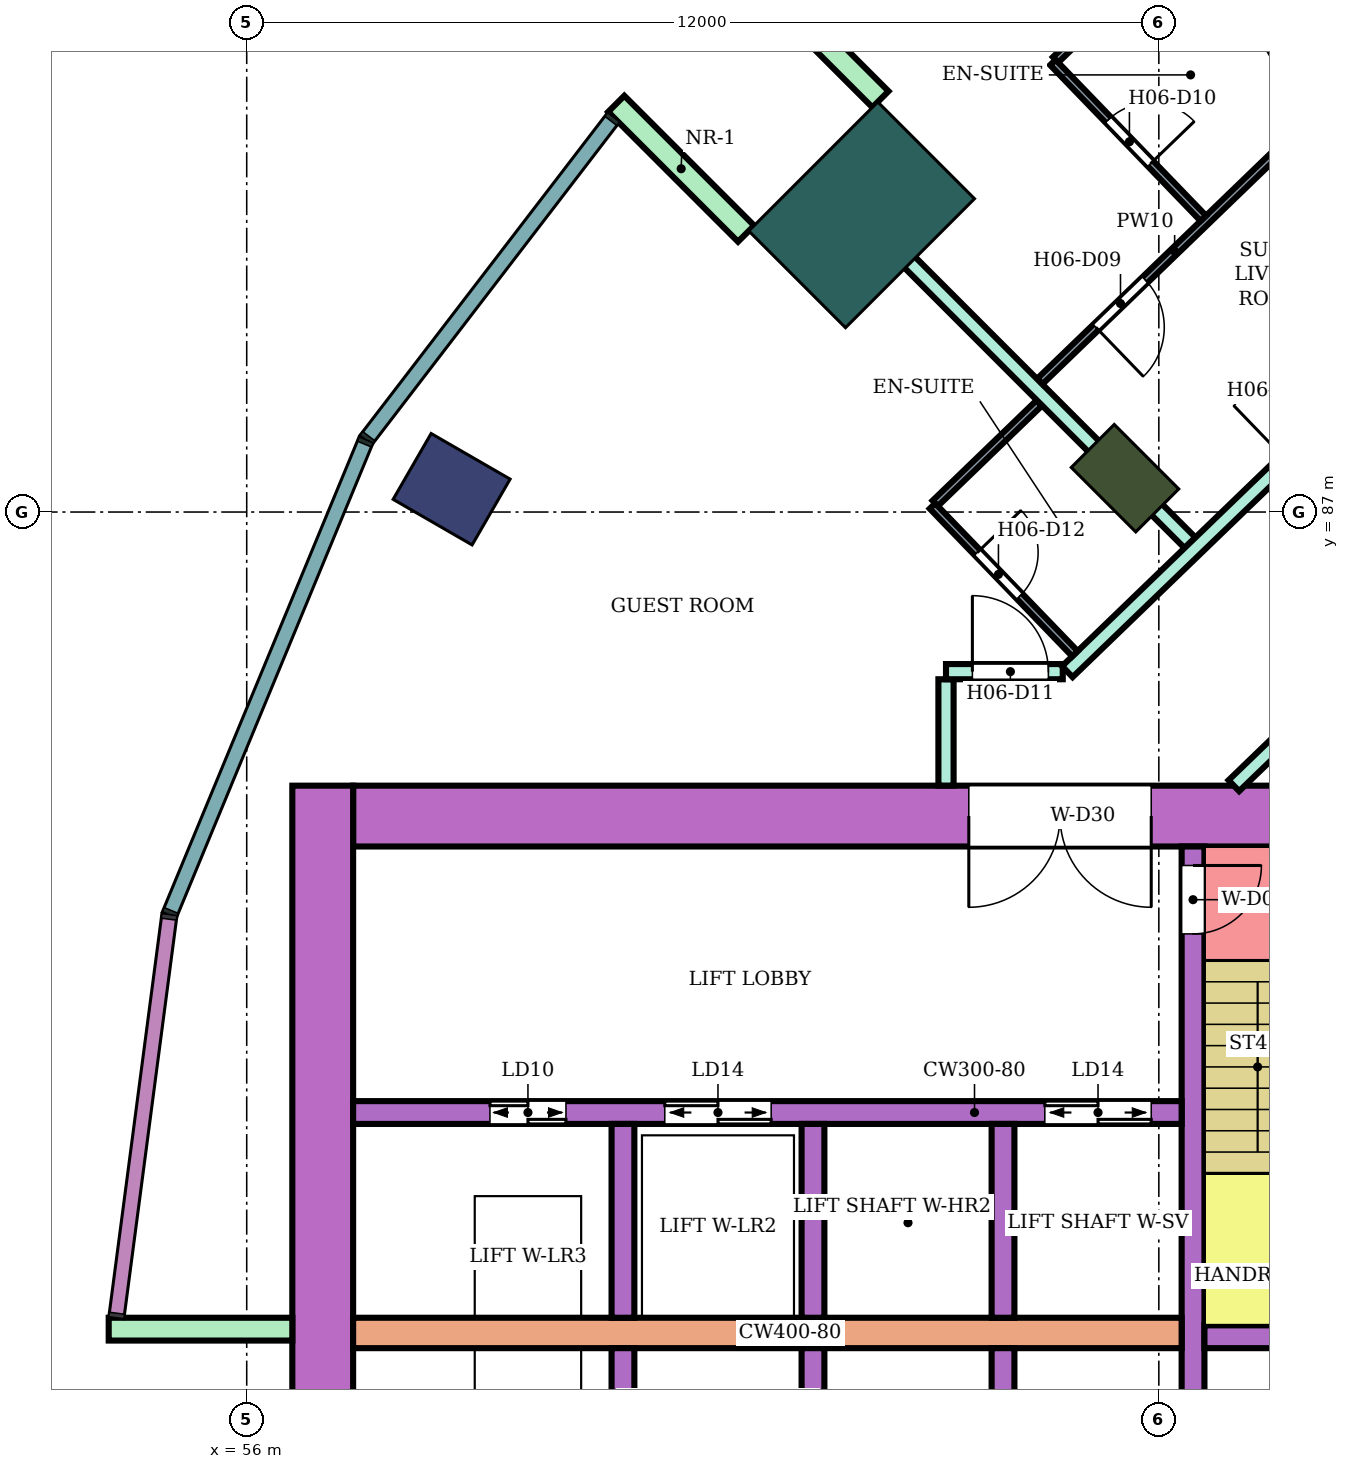
"""IFC4 building model, lengths in metres.
Left out: names, types, materials, properties, quantities, classifications, styles, units other than length and angle.
Written with IfcOpenShell. Run it as: python <this file> out.ifc"""

import sys

from ifc_helpers import new_model, si_unit, direction, frame, frame_2d, origin, origin_2d, place, context, subcontext, project, spatial, rectangle, extrude, element, fill, save


model = new_model("IFC4")
c1 = context("Model", 3, precision=1e-05, world=origin(), true_north=direction((0.0, 1.0)))
c2 = subcontext(c1, "Body", "Model", "MODEL_VIEW")
j1 = project(units=[si_unit("LENGTHUNIT", "METRE"), si_unit("PLANEANGLEUNIT", "RADIAN")], contexts=[c1])
p1 = place(None, origin())
s1 = spatial("IfcSite", under=j1, at=p1, CompositionType="ELEMENT")
p2 = place(p1, origin())
s2 = spatial("IfcBuilding", under=s1, at=p2, CompositionType="ELEMENT")
p3 = place(p2, frame((0.0, 0.0, 97.6)))
s3 = spatial("IfcBuildingStorey", under=s2, at=p3, CompositionType="ELEMENT", Elevation=97.6)
p4 = place(p3, frame((58.696, 87.3, 0.0), z_axis=(0.0, 0.0, 1.0), x_axis=(-0.866025403784, 0.5, 0.0)))
e1 = element("IfcColumn", 1, at=p4, inside=s3, PredefinedType="COLUMN", context=c2, shape_type="SweptSolid", body=[
    extrude(rectangle(XDim=1.2, YDim=1.0, at=origin_2d()), origin(), (0.0, 0.0, 1.0), 3.8),
])
p5 = place(p3, frame((67.555, 87.445, 0.0), z_axis=(0.0, 0.0, 1.0), x_axis=(-0.707106781187, 0.707106781187, 0.0)))
e2 = element("IfcColumn", 2, at=p5, inside=s3, PredefinedType="COLUMN", context=c2, shape_type="SweptSolid", body=[
    extrude(rectangle(XDim=1.2, YDim=0.8, at=origin_2d()), origin(), (0.0, 0.0, 1.0), 3.8),
])
p6 = place(p3, frame((64.09, 90.91, 0.0), z_axis=(0.0, 0.0, 1.0), x_axis=(-0.707106781187, 0.707106781187, 0.0)))
e3 = element("IfcColumn", 3, at=p6, inside=s3, PredefinedType="COLUMN", context=c2, shape_type="SweptSolid", body=[
    extrude(rectangle(XDim=1.8, YDim=2.4, at=origin_2d()), origin(), (0.0, 0.0, 1.0), 3.8),
])
p7 = place(p3, frame((72.1, 83.0, 0.0), z_axis=(0.0, 0.0, 1.0), x_axis=(-1.0, 0.0, 0.0)))
e4 = element("IfcWall", 4, at=p7, inside=s3, PredefinedType="SHEAR", context=c2, shape_type="SweptSolid", body=[
    extrude(rectangle(XDim=14.7, YDim=0.8, at=frame_2d((7.35, 0.0))), origin(), (0.0, 0.0, 1.0), 3.48),
])
p8 = place(p7, frame((4.2, 0.0, 0.0)))
e5 = element("IfcOpeningElement", 5, at=p8, cuts=e4, PredefinedType="OPENING", context=c2, shape_type="SweptSolid", body=[
    extrude(rectangle(XDim=2.4, YDim=2.4, at=frame_2d((1.2, 1.2))), frame((0.0, 0.41, 0.0), z_axis=(0.0, -1.0, 0.0), x_axis=(1.0, 0.0, 0.0)), (0.0, 0.0, 1.0), 0.82),
])
p9 = place(p3, frame((57.0, 83.4, 0.0), z_axis=(0.0, 0.0, 1.0), x_axis=(0.0, -1.0, 0.0)))
e6 = element("IfcWall", 6, at=p9, inside=s3, PredefinedType="SHEAR", context=c2, shape_type="SweptSolid", body=[
    extrude(rectangle(XDim=16.8, YDim=0.8, at=frame_2d((8.4, 0.0))), origin(), (0.0, 0.0, 1.0), 3.48),
])
p10 = place(p3, frame((68.45, 82.6, 0.0), z_axis=(0.0, 0.0, 1.0), x_axis=(0.0, -1.0, 0.0)))
e7 = element("IfcWall", 7, at=p10, inside=s3, PredefinedType="SHEAR", context=c2, shape_type="SweptSolid", body=[
    extrude(rectangle(XDim=7.6, YDim=0.3, at=frame_2d((3.8, 0.0))), origin(), (0.0, 0.0, 1.0), 3.48),
])
p11 = place(p10, frame((0.25, 0.0, 0.0)))
e8 = element("IfcOpeningElement", 8, at=p11, cuts=e7, PredefinedType="OPENING", context=c2, shape_type="SweptSolid", body=[
    extrude(rectangle(XDim=0.9, YDim=2.1, at=frame_2d((0.45, 1.05))), frame((0.0, 0.16, 0.0), z_axis=(0.0, -1.0, 0.0), x_axis=(1.0, 0.0, 0.0)), (0.0, 0.0, 1.0), 0.32),
])
p12 = place(p3, frame((71.65, 76.15, 0.0), z_axis=(0.0, 0.0, 1.0), x_axis=(-1.0, 0.0, 0.0)))
e9 = element("IfcWall", 9, at=p12, inside=s3, PredefinedType="SHEAR", context=c2, shape_type="SweptSolid", body=[
    extrude(rectangle(XDim=3.05, YDim=0.3, at=frame_2d((1.525, 0.0))), origin(), (0.0, 0.0, 1.0), 3.48),
])
p13 = place(p3, frame((68.3, 76.2, 0.0), z_axis=(0.0, 0.0, 1.0), x_axis=(-1.0, 0.0, 0.0)))
e10 = element("IfcWall", 10, at=p13, inside=s3, PredefinedType="SHEAR", context=c2, shape_type="SweptSolid", body=[
    extrude(rectangle(XDim=10.9, YDim=0.4, at=frame_2d((5.45, 0.0))), origin(), (0.0, 0.0, 1.0), 3.48),
])
p14 = place(p3, frame((68.3, 79.1, 0.0), z_axis=(0.0, 0.0, 1.0), x_axis=(-1.0, 0.0, 0.0)))
e11 = element("IfcWall", 11, at=p14, inside=s3, PredefinedType="SHEAR", context=c2, shape_type="SweptSolid", body=[
    extrude(rectangle(XDim=10.9, YDim=0.3, at=frame_2d((5.45, 0.0))), origin(), (0.0, 0.0, 1.0), 3.48),
])
p15 = place(p14, frame((0.4, 0.0, 0.0)))
e12 = element("IfcOpeningElement", 12, at=p15, cuts=e11, PredefinedType="OPENING", context=c2, shape_type="SweptSolid", body=[
    extrude(rectangle(XDim=1.4, YDim=2.1, at=frame_2d((0.7, 1.05))), frame((0.0, 0.16, 0.0), z_axis=(0.0, -1.0, 0.0), x_axis=(1.0, 0.0, 0.0)), (0.0, 0.0, 1.0), 0.32),
])
p16 = place(p14, frame((5.4, 0.0, 0.0)))
e13 = element("IfcOpeningElement", 13, at=p16, cuts=e11, PredefinedType="OPENING", context=c2, shape_type="SweptSolid", body=[
    extrude(rectangle(XDim=1.4, YDim=2.1, at=frame_2d((0.7, 1.05))), frame((0.0, 0.16, 0.0), z_axis=(0.0, -1.0, 0.0), x_axis=(1.0, 0.0, 0.0)), (0.0, 0.0, 1.0), 0.32),
])
p17 = place(p14, frame((8.1, 0.0, 0.0)))
e14 = element("IfcOpeningElement", 14, at=p17, cuts=e11, PredefinedType="OPENING", context=c2, shape_type="SweptSolid", body=[
    extrude(rectangle(XDim=1.0, YDim=2.1, at=frame_2d((0.5, 1.05))), frame((0.0, 0.16, 0.0), z_axis=(0.0, -1.0, 0.0), x_axis=(1.0, 0.0, 0.0)), (0.0, 0.0, 1.0), 0.32),
])
for number, where, z_axis, x_axis in (
    (15, (65.95, 76.0, 0.0), (0.0, 0.0, 1.0), (0.0, -1.0, 0.0)),
    (16, (63.45, 76.0, 0.0), (0.0, 0.0, 1.0), (0.0, -1.0, 0.0)),
    (17, (60.95, 76.0, 0.0), (0.0, 0.0, 1.0), (0.0, -1.0, 0.0)),
    (18, (65.95, 78.95, 0.0), (0.0, 0.0, 1.0), (0.0, -1.0, 0.0)),
    (19, (63.45, 78.95, 0.0), (0.0, 0.0, 1.0), (0.0, -1.0, 0.0)),
    (20, (60.95, 78.95, 0.0), (0.0, 0.0, 1.0), (0.0, -1.0, 0.0)),
):
    element("IfcWall", number, at=place(p3, frame(where, z_axis=z_axis, x_axis=x_axis)), inside=s3, PredefinedType="SHEAR", context=c2, shape_type="SweptSolid", body=[
        extrude(rectangle(XDim=2.55, YDim=0.3, at=frame_2d((1.275, 0.0))), origin(), (0.0, 0.0, 1.0), 3.48),
    ])
for number, where, z_axis, x_axis in (
    (21, (64.338, 92.43, 0.0), (0.0, 0.0, 1.0), (-0.707, 0.707, 0.0)),
    (22, (62.57, 90.662, 0.0), (0.0, 0.0, 1.0), (-0.707, 0.707, 0.0)),
    (23, (56.6, 76.25, 0.0), (0.0, 0.0, 1.0), (-1.0, 0.0, 0.0)),
):
    element("IfcWall", number, at=place(p3, frame(where, z_axis=z_axis, x_axis=x_axis)), inside=s3, PredefinedType="NOTDEFINED", context=c2, shape_type="SweptSolid", body=[
        extrude(rectangle(XDim=2.416, YDim=0.3, at=frame_2d((1.208, 0.0))), origin(), (0.0, 0.0, 1.0), 3.8),
    ])
p18 = place(p3, frame((63.6, 91.409, 0.0), z_axis=(0.0, 0.0, 1.0), x_axis=(0.706945318761, -0.707268206752, 0.0)))
e24 = element("IfcWall", 24, at=p18, inside=s3, PredefinedType="PARTITIONING", context=c2, shape_type="SweptSolid", body=[
    extrude(rectangle(XDim=6.805, YDim=0.2, at=frame_2d((3.402, 0.0))), origin(), (0.0, 0.0, 1.0), 3.35),
])
p19 = place(p3, frame((65.2, 83.401, 0.0), z_axis=(0.0, 0.0, 1.0), x_axis=(0.0, 1.0, 0.0)))
e25 = element("IfcWall", 25, at=p19, inside=s3, PredefinedType="PARTITIONING", context=c2, shape_type="SweptSolid", body=[
    extrude(rectangle(XDim=1.399, YDim=0.2, at=frame_2d((0.7, 0.0))), origin(), (0.0, 0.0, 1.0), 3.35),
])
p20 = place(p3, frame((65.2, 84.9, 0.0), z_axis=(0.0, 0.0, 1.0), x_axis=(1.0, 0.0, 0.0)))
e26 = element("IfcWall", 26, at=p20, inside=s3, PredefinedType="PARTITIONING", context=c2, shape_type="SweptSolid", body=[
    extrude(rectangle(XDim=1.536, YDim=0.2, at=frame_2d((0.768, 0.0))), origin(), (0.0, 0.0, 1.0), 3.35),
])
p21 = place(p20, frame((0.347, 0.0, 0.0)))
e27 = element("IfcOpeningElement", 27, at=p21, cuts=e26, PredefinedType="OPENING", context=c2, shape_type="SweptSolid", body=[
    extrude(rectangle(XDim=1.0, YDim=2.1, at=frame_2d((0.5, 1.05))), frame((0.0, 0.11, 0.0), z_axis=(0.0, -1.0, 0.0), x_axis=(1.0, 0.0, 0.0)), (0.0, 0.0, 1.0), 0.22),
])
p22 = place(p3, frame((66.796, 84.9, 0.0), z_axis=(0.0, 0.0, 1.0), x_axis=(0.719690784855, 0.694294731505, 0.0)))
e28 = element("IfcWall", 28, at=p22, inside=s3, PredefinedType="PARTITIONING", context=c2, shape_type="SweptSolid", body=[
    extrude(rectangle(XDim=6.585, YDim=0.2, at=frame_2d((3.292, 0.0))), origin(), (0.0, 0.0, 1.0), 3.35),
])
p23 = place(p22, frame((4.006, 0.0, 0.0)))
e29 = element("IfcOpeningElement", 29, at=p23, cuts=e28, PredefinedType="OPENING", context=c2, shape_type="SweptSolid", body=[
    extrude(rectangle(XDim=1.0, YDim=2.1, at=frame_2d((0.5, 1.05))), frame((0.0, 0.11, 0.0), z_axis=(0.0, -1.0, 0.0), x_axis=(1.0, 0.0, 0.0)), (0.0, 0.0, 1.0), 0.22),
])
p24 = place(p3, frame((67.102, 97.342, 0.0), z_axis=(0.0, 0.0, 1.0), x_axis=(0.499900389553, -0.866082906265, 0.0)))
e30 = element("IfcWall", 30, at=p24, inside=s3, PredefinedType="PARTITIONING", context=c2, shape_type="SweptSolid", body=[
    extrude(rectangle(XDim=8.908, YDim=0.2, at=frame_2d((4.454, 0.0))), origin(), (0.0, 0.0, 1.0), 3.35),
])
p25 = place(p3, frame((68.987, 83.4, 0.0), z_axis=(0.0, 0.0, 1.0), x_axis=(0.719586298962, 0.694403022997, 0.0)))
e31 = element("IfcWall", 31, at=p25, inside=s3, PredefinedType="PARTITIONING", context=c2, shape_type="SweptSolid", body=[
    extrude(rectangle(XDim=5.439, YDim=0.2, at=frame_2d((2.719, 0.0))), origin(), (0.0, 0.0, 1.0), 3.35),
])
p26 = place(p3, frame((65.058, 87.114, 0.0), z_axis=(0.0, 0.0, 1.0), x_axis=(0.719653890619, 0.694332973232, 0.0)))
e32 = element("IfcWall", 32, at=p26, inside=s3, PredefinedType="PARTITIONING", context=c2, shape_type="SweptSolid", body=[
    extrude(rectangle(XDim=1.899, YDim=0.1, at=frame_2d((0.95, 0.0))), origin(), (0.0, 0.0, 1.0), 3.35),
])
p27 = place(p3, frame((65.022, 87.079, 0.0), z_axis=(0.0, 0.0, 1.0), x_axis=(0.694287838235, -0.719697434815, 0.0)))
e33 = element("IfcWall", 33, at=p27, inside=s3, PredefinedType="PARTITIONING", context=c2, shape_type="SweptSolid", body=[
    extrude(rectangle(XDim=2.7, YDim=0.1, at=frame_2d((1.35, 0.0))), origin(), (0.0, 0.0, 1.0), 3.35),
])
p28 = place(p27, frame((0.85, 0.0, 0.0)))
e34 = element("IfcOpeningElement", 34, at=p28, cuts=e33, PredefinedType="OPENING", context=c2, shape_type="SweptSolid", body=[
    extrude(rectangle(XDim=0.8, YDim=2.1, at=frame_2d((0.4, 1.05))), frame((0.0, 0.06, 0.0), z_axis=(0.0, -1.0, 0.0), x_axis=(1.0, 0.0, 0.0)), (0.0, 0.0, 1.0), 0.12),
])
p29 = place(p3, frame((66.436, 88.72, 0.0), z_axis=(0.0, 0.0, 1.0), x_axis=(0.719585934284, 0.694403400899, 0.0)))
e35 = element("IfcWall", 35, at=p29, inside=s3, PredefinedType="PARTITIONING", context=c2, shape_type="SweptSolid", body=[
    extrude(rectangle(XDim=4.925, YDim=0.1, at=frame_2d((2.462, 0.0))), origin(), (0.0, 0.0, 1.0), 3.35),
])
p30 = place(p29, frame((1.022, 0.0, 0.0)))
e36 = element("IfcOpeningElement", 36, at=p30, cuts=e35, PredefinedType="OPENING", context=c2, shape_type="SweptSolid", body=[
    extrude(rectangle(XDim=0.9, YDim=2.1, at=frame_2d((0.45, 1.05))), frame((0.0, 0.06, 0.0), z_axis=(0.0, -1.0, 0.0), x_axis=(1.0, 0.0, 0.0)), (0.0, 0.0, 1.0), 0.12),
])
p31 = place(p3, frame((66.642, 92.95, 0.0), z_axis=(0.0, 0.0, 1.0), x_axis=(0.719667412702, 0.694318957753, 0.0)))
e37 = element("IfcWall", 37, at=p31, inside=s3, PredefinedType="PARTITIONING", context=c2, shape_type="SweptSolid", body=[
    extrude(rectangle(XDim=2.562, YDim=0.1, at=frame_2d((1.281, 0.0))), origin(), (0.0, 0.0, 1.0), 3.35),
])
p32 = place(p3, frame((66.606, 92.915, 0.0), z_axis=(0.0, 0.0, 1.0), x_axis=(0.694403413121, -0.71958592249, 0.0)))
e38 = element("IfcWall", 38, at=p32, inside=s3, PredefinedType="PARTITIONING", context=c2, shape_type="SweptSolid", body=[
    extrude(rectangle(XDim=2.85, YDim=0.1, at=frame_2d((1.425, 0.0))), origin(), (0.0, 0.0, 1.0), 3.35),
])
p33 = place(p32, frame((1.05, 0.0, 0.0)))
e39 = element("IfcOpeningElement", 39, at=p33, cuts=e38, PredefinedType="OPENING", context=c2, shape_type="SweptSolid", body=[
    extrude(rectangle(XDim=0.8, YDim=2.1, at=frame_2d((0.4, 1.05))), frame((0.0, 0.06, 0.0), z_axis=(0.0, -1.0, 0.0), x_axis=(1.0, 0.0, 0.0)), (0.0, 0.0, 1.0), 0.12),
])
p34 = place(p30, frame((0.9, 0.0, 0.0), z_axis=(0.0, 0.0, 1.0), x_axis=(-1.0, 0.0, 0.0)))
e40 = element("IfcDoor", 40, at=p34, inside=s3, OperationType="SINGLE_SWING_RIGHT", PredefinedType="DOOR", context=c2, shape_type="SweptSolid", body=[
    extrude(rectangle(XDim=0.9, YDim=2.1, at=frame_2d((0.45, 1.05))), frame((0.0, 0.025, 0.0), z_axis=(0.0, -1.0, 0.0), x_axis=(1.0, 0.0, 0.0)), (0.0, 0.0, 1.0), 0.05),
])
fill(e36, e40)
p35 = place(p33, origin())
e41 = element("IfcDoor", 41, at=p35, inside=s3, OperationType="SINGLE_SWING_RIGHT", PredefinedType="DOOR", context=c2, shape_type="SweptSolid", body=[
    extrude(rectangle(XDim=0.8, YDim=2.1, at=frame_2d((0.4, 1.05))), frame((0.0, 0.025, 0.0), z_axis=(0.0, -1.0, 0.0), x_axis=(1.0, 0.0, 0.0)), (0.0, 0.0, 1.0), 0.05),
])
fill(e39, e41)
p36 = place(p21, origin())
e42 = element("IfcDoor", 42, at=p36, inside=s3, OperationType="SINGLE_SWING_LEFT", PredefinedType="DOOR", context=c2, shape_type="SweptSolid", body=[
    extrude(rectangle(XDim=1.0, YDim=2.1, at=frame_2d((0.5, 1.05))), frame((0.0, 0.025, 0.0), z_axis=(0.0, -1.0, 0.0), x_axis=(1.0, 0.0, 0.0)), (0.0, 0.0, 1.0), 0.05),
])
fill(e27, e42)
p37 = place(p28, origin())
e43 = element("IfcDoor", 43, at=p37, inside=s3, OperationType="SINGLE_SWING_LEFT", PredefinedType="DOOR", context=c2, shape_type="SweptSolid", body=[
    extrude(rectangle(XDim=0.8, YDim=2.1, at=frame_2d((0.4, 1.05))), frame((0.0, 0.025, 0.0), z_axis=(0.0, -1.0, 0.0), x_axis=(1.0, 0.0, 0.0)), (0.0, 0.0, 1.0), 0.05),
])
fill(e34, e43)
p38 = place(p11, origin())
e44 = element("IfcDoor", 44, at=p38, inside=s3, OperationType="SINGLE_SWING_LEFT", PredefinedType="DOOR", context=c2, shape_type="SweptSolid", body=[
    extrude(rectangle(XDim=0.9, YDim=2.1, at=frame_2d((0.45, 1.05))), frame((0.0, 0.025, 0.0), z_axis=(0.0, -1.0, 0.0), x_axis=(1.0, 0.0, 0.0)), (0.0, 0.0, 1.0), 0.05),
])
fill(e8, e44)
p39 = place(p15, origin())
e45 = element("IfcDoor", 45, at=p39, inside=s3, OperationType="DOUBLE_DOOR_SLIDING", PredefinedType="DOOR", context=c2, shape_type="SweptSolid", body=[
    extrude(rectangle(XDim=1.4, YDim=2.1, at=frame_2d((0.7, 1.05))), frame((0.0, 0.025, 0.0), z_axis=(0.0, -1.0, 0.0), x_axis=(1.0, 0.0, 0.0)), (0.0, 0.0, 1.0), 0.05),
])
fill(e12, e45)
p40 = place(p16, origin())
e46 = element("IfcDoor", 46, at=p40, inside=s3, OperationType="DOUBLE_DOOR_SLIDING", PredefinedType="DOOR", context=c2, shape_type="SweptSolid", body=[
    extrude(rectangle(XDim=1.4, YDim=2.1, at=frame_2d((0.7, 1.05))), frame((0.0, 0.025, 0.0), z_axis=(0.0, -1.0, 0.0), x_axis=(1.0, 0.0, 0.0)), (0.0, 0.0, 1.0), 0.05),
])
fill(e13, e46)
p41 = place(p17, origin())
e47 = element("IfcDoor", 47, at=p41, inside=s3, OperationType="DOUBLE_DOOR_SLIDING", PredefinedType="DOOR", context=c2, shape_type="SweptSolid", body=[
    extrude(rectangle(XDim=1.0, YDim=2.1, at=frame_2d((0.5, 1.05))), frame((0.0, 0.025, 0.0), z_axis=(0.0, -1.0, 0.0), x_axis=(1.0, 0.0, 0.0)), (0.0, 0.0, 1.0), 0.05),
])
fill(e14, e47)
p42 = place(p8, origin())
e48 = element("IfcDoor", 48, at=p42, inside=s3, OperationType="DOUBLE_DOOR_SINGLE_SWING", PredefinedType="DOOR", context=c2, shape_type="SweptSolid", body=[
    extrude(rectangle(XDim=2.4, YDim=2.4, at=frame_2d((1.2, 1.2))), frame((0.0, 0.025, 0.0), z_axis=(0.0, -1.0, 0.0), x_axis=(1.0, 0.0, 0.0)), (0.0, 0.0, 1.0), 0.05),
])
fill(e5, e48)
save(model, sys.argv[1])
